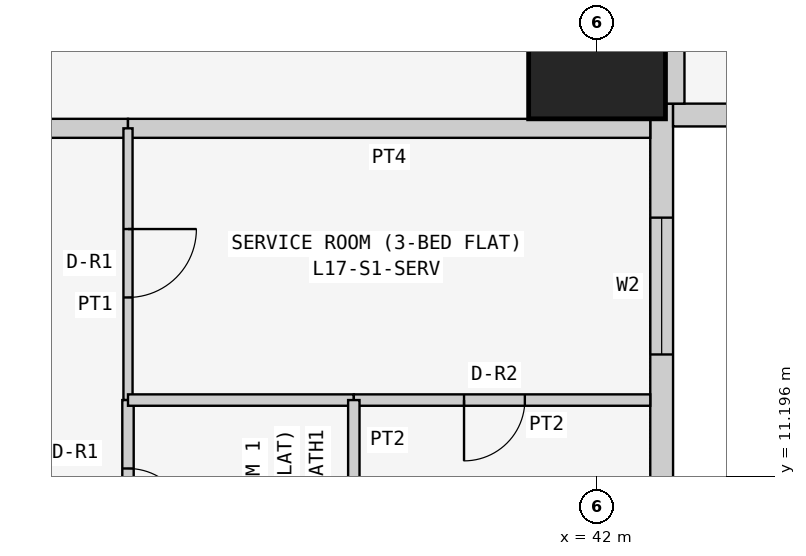
"""IFC4 building model, lengths in metres.
Left out: names, types, materials, properties, quantities, classifications, styles, units other than length and angle.
Written with IfcOpenShell. Run it as: python <this file> out.ifc"""

import sys

from ifc_helpers import new_model, si_unit, direction, frame, frame_2d, origin, origin_2d, place, context, subcontext, project, spatial, rectangle, extrude, element, fill, save


model = new_model("IFC4")
c1 = context("Model", 3, precision=1e-05, world=origin(), true_north=direction((0.0, 1.0)))
c2 = subcontext(c1, "Body", "Model", "MODEL_VIEW")
j1 = project(units=[si_unit("LENGTHUNIT", "METRE"), si_unit("PLANEANGLEUNIT", "RADIAN")], contexts=[c1])
p1 = place(None, origin())
s1 = spatial("IfcSite", under=j1, at=p1, CompositionType="ELEMENT")
p2 = place(p1, origin())
s2 = spatial("IfcBuilding", under=s1, at=p2, CompositionType="ELEMENT")
p3 = place(p2, frame((0.0, 0.0, 70.5)))
s3 = spatial("IfcBuildingStorey", under=s2, at=p3, CompositionType="ELEMENT", Elevation=70.5)
p4 = place(p3, frame((42.0, 16.8, 0.0), z_axis=(0.0, 0.0, 1.0), x_axis=(1.0, 0.0, 0.0)))
e1 = element("IfcColumn", 1, at=p4, inside=s3, PredefinedType="COLUMN", context=c2, shape_type="SweptSolid", body=[
    extrude(rectangle(XDim=1.8, YDim=1.8, at=origin_2d()), origin(), (0.0, 0.0, 1.0), 3.6),
])
p5 = place(p3, frame((42.85, 0.4, 0.0), z_axis=(0.0, 0.0, 1.0), x_axis=(0.0, 1.0, 0.0)))
e2 = element("IfcWall", 2, at=p5, inside=s3, PredefinedType="SOLIDWALL", context=c2, shape_type="SweptSolid", body=[
    extrude(rectangle(XDim=15.7, YDim=0.3, at=frame_2d((7.85, 0.0))), origin(), (0.0, 0.0, 1.0), 3.45),
])
p6 = place(p5, frame((12.4, 0.0, 0.9)))
e3 = element("IfcOpeningElement", 3, at=p6, cuts=e2, PredefinedType="OPENING", context=c2, shape_type="SweptSolid", body=[
    extrude(rectangle(XDim=1.8, YDim=1.5, at=frame_2d((0.9, 0.75))), frame((0.0, 0.16, 0.0), z_axis=(0.0, -1.0, 0.0), x_axis=(1.0, 0.0, 0.0)), (0.0, 0.0, 1.0), 0.32),
])
p7 = place(p5, frame((9.55, 0.0, 1.5)))
e4 = element("IfcOpeningElement", 4, at=p7, cuts=e2, PredefinedType="OPENING", context=c2, shape_type="SweptSolid", body=[
    extrude(rectangle(XDim=0.9, YDim=0.7, at=frame_2d((0.45, 0.35))), frame((0.0, 0.16, 0.0), z_axis=(0.0, -1.0, 0.0), x_axis=(1.0, 0.0, 0.0)), (0.0, 0.0, 1.0), 0.32),
])
p8 = place(p5, frame((5.1, 0.0, 0.9)))
e5 = element("IfcOpeningElement", 5, at=p8, cuts=e2, PredefinedType="OPENING", context=c2, shape_type="SweptSolid", body=[
    extrude(rectangle(XDim=1.8, YDim=1.5, at=frame_2d((0.9, 0.75))), frame((0.0, 0.16, 0.0), z_axis=(0.0, -1.0, 0.0), x_axis=(1.0, 0.0, 0.0)), (0.0, 0.0, 1.0), 0.32),
])
p9 = place(p5, frame((2.0, 0.0, 0.0)))
e6 = element("IfcOpeningElement", 6, at=p9, cuts=e2, PredefinedType="OPENING", context=c2, shape_type="SweptSolid", body=[
    extrude(rectangle(XDim=0.9, YDim=2.4, at=frame_2d((0.45, 1.2))), frame((0.0, 0.16, 0.0), z_axis=(0.0, -1.0, 0.0), x_axis=(1.0, 0.0, 0.0)), (0.0, 0.0, 1.0), 0.32),
])
p10 = place(p5, frame((0.7, 0.0, 0.9)))
e7 = element("IfcOpeningElement", 7, at=p10, cuts=e2, PredefinedType="OPENING", context=c2, shape_type="SweptSolid", body=[
    extrude(rectangle(XDim=1.2, YDim=1.5, at=frame_2d((0.6, 0.75))), frame((0.0, 0.16, 0.0), z_axis=(0.0, -1.0, 0.0), x_axis=(1.0, 0.0, 0.0)), (0.0, 0.0, 1.0), 0.32),
])
p11 = place(p3, frame((43.0, 15.95, 0.0), z_axis=(0.0, 0.0, 1.0), x_axis=(1.0, 0.0, 0.0)))
e8 = element("IfcWall", 8, at=p11, inside=s3, PredefinedType="SOLIDWALL", context=c2, shape_type="SweptSolid", body=[
    extrude(rectangle(XDim=15.4, YDim=0.3, at=frame_2d((7.7, 0.0))), origin(), (0.0, 0.0, 1.0), 3.45),
])
p12 = place(p11, frame((1.2, 0.0, 0.9)))
e9 = element("IfcOpeningElement", 9, at=p12, cuts=e8, PredefinedType="OPENING", context=c2, shape_type="SweptSolid", body=[
    extrude(rectangle(XDim=1.8, YDim=1.5, at=frame_2d((0.9, 0.75))), frame((0.0, 0.16, 0.0), z_axis=(0.0, -1.0, 0.0), x_axis=(1.0, 0.0, 0.0)), (0.0, 0.0, 1.0), 0.32),
])
p13 = place(p11, frame((4.95, 0.0, 1.5)))
e10 = element("IfcOpeningElement", 10, at=p13, cuts=e8, PredefinedType="OPENING", context=c2, shape_type="SweptSolid", body=[
    extrude(rectangle(XDim=0.9, YDim=0.7, at=frame_2d((0.45, 0.35))), frame((0.0, 0.16, 0.0), z_axis=(0.0, -1.0, 0.0), x_axis=(1.0, 0.0, 0.0)), (0.0, 0.0, 1.0), 0.32),
])
p14 = place(p11, frame((8.5, 0.0, 0.9)))
e11 = element("IfcOpeningElement", 11, at=p14, cuts=e8, PredefinedType="OPENING", context=c2, shape_type="SweptSolid", body=[
    extrude(rectangle(XDim=1.8, YDim=1.5, at=frame_2d((0.9, 0.75))), frame((0.0, 0.16, 0.0), z_axis=(0.0, -1.0, 0.0), x_axis=(1.0, 0.0, 0.0)), (0.0, 0.0, 1.0), 0.32),
])
p15 = place(p11, frame((12.5, 0.0, 0.0)))
e12 = element("IfcOpeningElement", 12, at=p15, cuts=e8, PredefinedType="OPENING", context=c2, shape_type="SweptSolid", body=[
    extrude(rectangle(XDim=0.9, YDim=2.4, at=frame_2d((0.45, 1.2))), frame((0.0, 0.16, 0.0), z_axis=(0.0, -1.0, 0.0), x_axis=(1.0, 0.0, 0.0)), (0.0, 0.0, 1.0), 0.32),
])
p16 = place(p11, frame((13.5, 0.0, 0.9)))
e13 = element("IfcOpeningElement", 13, at=p16, cuts=e8, PredefinedType="OPENING", context=c2, shape_type="SweptSolid", body=[
    extrude(rectangle(XDim=1.2, YDim=1.5, at=frame_2d((0.6, 0.75))), frame((0.0, 0.16, 0.0), z_axis=(0.0, -1.0, 0.0), x_axis=(1.0, 0.0, 0.0)), (0.0, 0.0, 1.0), 0.32),
])
p17 = place(p3, frame((43.025, 22.971, 0.0), z_axis=(0.0, 0.0, 1.0), x_axis=(0.0, -1.0, 0.0)))
e14 = element("IfcWall", 14, at=p17, inside=s3, PredefinedType="PARTITIONING", context=c2, shape_type="SweptSolid", body=[
    extrude(rectangle(XDim=6.871, YDim=0.25, at=frame_2d((3.436, 0.0))), origin(), (0.0, 0.0, 1.0), 3.45),
])
p18 = place(p3, frame((35.829, 15.775, 0.0), z_axis=(0.0, 0.0, 1.0), x_axis=(-1.0, 0.0, 0.0)))
e15 = element("IfcWall", 15, at=p18, inside=s3, PredefinedType="PARTITIONING", context=c2, shape_type="SweptSolid", body=[
    extrude(rectangle(XDim=1.2, YDim=0.25, at=frame_2d((0.6, 0.0))), origin(), (0.0, 0.0, 1.0), 3.45),
])
p19 = place(p3, frame((42.7, 15.775, 0.0), z_axis=(0.0, 0.0, 1.0), x_axis=(-1.0, 0.0, 0.0)))
e16 = element("IfcWall", 16, at=p19, inside=s3, PredefinedType="PARTITIONING", context=c2, shape_type="SweptSolid", body=[
    extrude(rectangle(XDim=6.871, YDim=0.25, at=frame_2d((3.436, 0.0))), origin(), (0.0, 0.0, 1.0), 3.45),
])
p20 = place(p3, frame((35.829, 12.2, 0.0), z_axis=(0.0, 0.0, 1.0), x_axis=(0.0, 1.0, 0.0)))
e17 = element("IfcWall", 17, at=p20, inside=s3, PredefinedType="PARTITIONING", context=c2, shape_type="SweptSolid", body=[
    extrude(rectangle(XDim=3.575, YDim=0.12, at=frame_2d((1.788, 0.0))), origin(), (0.0, 0.0, 1.0), 3.45),
])
p21 = place(p20, frame((1.35, 0.0, 0.0)))
e18 = element("IfcOpeningElement", 18, at=p21, cuts=e17, PredefinedType="OPENING", context=c2, shape_type="SweptSolid", body=[
    extrude(rectangle(XDim=0.9, YDim=2.1, at=frame_2d((0.45, 1.05))), frame((0.0, 0.07, 0.0), z_axis=(0.0, -1.0, 0.0), x_axis=(1.0, 0.0, 0.0)), (0.0, 0.0, 1.0), 0.14),
])
p22 = place(p3, frame((35.829, 9.6, 0.0), z_axis=(0.0, 0.0, 1.0), x_axis=(0.0, 1.0, 0.0)))
e19 = element("IfcWall", 19, at=p22, inside=s3, PredefinedType="PARTITIONING", context=c2, shape_type="SweptSolid", body=[
    extrude(rectangle(XDim=2.6, YDim=0.15, at=frame_2d((1.3, 0.0))), origin(), (0.0, 0.0, 1.0), 3.45),
])
p23 = place(p22, frame((0.9, 0.0, 0.0)))
e20 = element("IfcOpeningElement", 20, at=p23, cuts=e19, PredefinedType="OPENING", context=c2, shape_type="SweptSolid", body=[
    extrude(rectangle(XDim=0.8, YDim=2.1, at=frame_2d((0.4, 1.05))), frame((0.0, 0.085, 0.0), z_axis=(0.0, -1.0, 0.0), x_axis=(1.0, 0.0, 0.0)), (0.0, 0.0, 1.0), 0.17),
])
p24 = place(p3, frame((35.829, 12.2, 0.0), z_axis=(0.0, 0.0, 1.0), x_axis=(1.0, 0.0, 0.0)))
e21 = element("IfcWall", 21, at=p24, inside=s3, PredefinedType="PARTITIONING", context=c2, shape_type="SweptSolid", body=[
    extrude(rectangle(XDim=2.971, YDim=0.15, at=frame_2d((1.485, 0.0))), origin(), (0.0, 0.0, 1.0), 3.45),
])
p25 = place(p3, frame((38.8, 12.2, 0.0), z_axis=(0.0, 0.0, 1.0), x_axis=(1.0, 0.0, 0.0)))
e22 = element("IfcWall", 22, at=p25, inside=s3, PredefinedType="PARTITIONING", context=c2, shape_type="SweptSolid", body=[
    extrude(rectangle(XDim=3.9, YDim=0.15, at=frame_2d((1.95, 0.0))), origin(), (0.0, 0.0, 1.0), 3.45),
])
p26 = place(p25, frame((1.45, 0.0, 0.0)))
e23 = element("IfcOpeningElement", 23, at=p26, cuts=e22, PredefinedType="OPENING", context=c2, shape_type="SweptSolid", body=[
    extrude(rectangle(XDim=0.8, YDim=2.1, at=frame_2d((0.4, 1.05))), frame((0.0, 0.085, 0.0), z_axis=(0.0, -1.0, 0.0), x_axis=(1.0, 0.0, 0.0)), (0.0, 0.0, 1.0), 0.17),
])
p27 = place(p3, frame((38.8, 9.6, 0.0), z_axis=(0.0, 0.0, 1.0), x_axis=(0.0, 1.0, 0.0)))
e24 = element("IfcWall", 24, at=p27, inside=s3, PredefinedType="PARTITIONING", context=c2, shape_type="SweptSolid", body=[
    extrude(rectangle(XDim=2.6, YDim=0.15, at=frame_2d((1.3, 0.0))), origin(), (0.0, 0.0, 1.0), 3.45),
])
p28 = place(p6, origin())
e25 = element("IfcWindow", 25, at=p28, inside=s3, PartitioningType="SINGLE_PANEL", PredefinedType="WINDOW", context=c2, shape_type="SweptSolid", body=[
    extrude(rectangle(XDim=1.8, YDim=1.5, at=frame_2d((0.9, 0.75))), frame((0.0, 0.03, 0.0), z_axis=(0.0, -1.0, 0.0), x_axis=(1.0, 0.0, 0.0)), (0.0, 0.0, 1.0), 0.06),
])
fill(e3, e25)
p29 = place(p21, frame((0.9, 0.0, 0.0), z_axis=(0.0, 0.0, 1.0), x_axis=(-1.0, 0.0, 0.0)))
e26 = element("IfcDoor", 26, at=p29, inside=s3, OperationType="SINGLE_SWING_LEFT", PredefinedType="DOOR", context=c2, shape_type="SweptSolid", body=[
    extrude(rectangle(XDim=0.9, YDim=2.1, at=frame_2d((0.45, 1.05))), frame((0.0, 0.025, 0.0), z_axis=(0.0, -1.0, 0.0), x_axis=(1.0, 0.0, 0.0)), (0.0, 0.0, 1.0), 0.05),
])
fill(e18, e26)
p30 = place(p26, frame((0.8, 0.0, 0.0), z_axis=(0.0, 0.0, 1.0), x_axis=(-1.0, 0.0, 0.0)))
e27 = element("IfcDoor", 27, at=p30, inside=s3, OperationType="SINGLE_SWING_RIGHT", PredefinedType="DOOR", context=c2, shape_type="SweptSolid", body=[
    extrude(rectangle(XDim=0.8, YDim=2.1, at=frame_2d((0.4, 1.05))), frame((0.0, 0.025, 0.0), z_axis=(0.0, -1.0, 0.0), x_axis=(1.0, 0.0, 0.0)), (0.0, 0.0, 1.0), 0.05),
])
fill(e23, e27)
p31 = place(p23, frame((0.8, 0.0, 0.0), z_axis=(0.0, 0.0, 1.0), x_axis=(-1.0, 0.0, 0.0)))
e28 = element("IfcDoor", 28, at=p31, inside=s3, OperationType="SINGLE_SWING_RIGHT", PredefinedType="DOOR", context=c2, shape_type="SweptSolid", body=[
    extrude(rectangle(XDim=0.8, YDim=2.1, at=frame_2d((0.4, 1.05))), frame((0.0, 0.025, 0.0), z_axis=(0.0, -1.0, 0.0), x_axis=(1.0, 0.0, 0.0)), (0.0, 0.0, 1.0), 0.05),
])
fill(e20, e28)
save(model, sys.argv[1])
